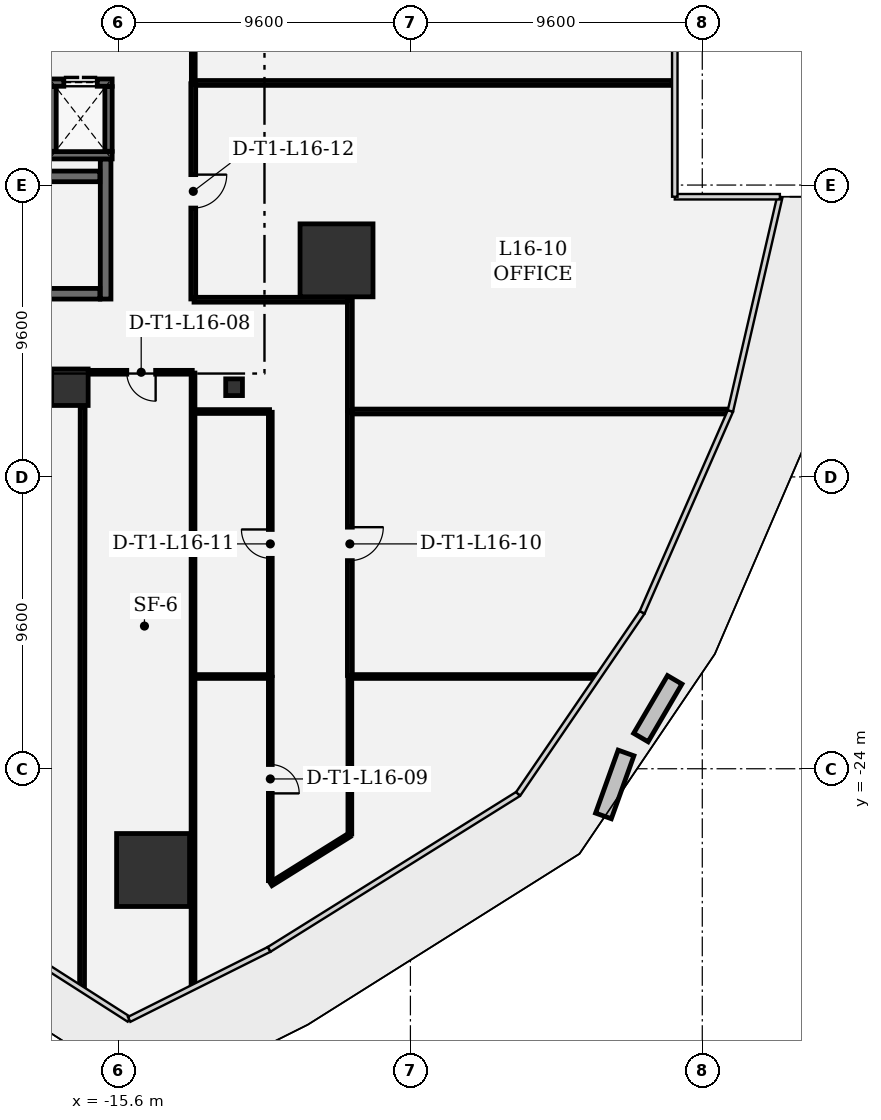
"""IFC4 building model, lengths in metres.
Left out: names, types, materials, properties, quantities, classifications, styles, units other than length and angle.
Written with IfcOpenShell. Run it as: python <this file> out.ifc"""

import sys

from ifc_helpers import new_model, si_unit, direction, frame, frame_2d, origin, origin_2d, place, context, subcontext, project, spatial, rectangle, extrude, element, fill, save


model = new_model("IFC4")
c1 = context("Model", 3, precision=1e-05, world=origin(), true_north=direction((0.0, 1.0)))
c2 = subcontext(c1, "Body", "Model", "MODEL_VIEW")
j1 = project(units=[si_unit("LENGTHUNIT", "METRE"), si_unit("PLANEANGLEUNIT", "RADIAN")], contexts=[c1])
p1 = place(None, origin())
s1 = spatial("IfcSite", under=j1, at=p1, CompositionType="ELEMENT")
p2 = place(p1, origin())
s2 = spatial("IfcBuilding", under=s1, at=p2, CompositionType="ELEMENT")
p3 = place(p2, frame((0.0, 0.0, 74.4)))
s3 = spatial("IfcBuildingStorey", under=s2, at=p3, CompositionType="ELEMENT", Elevation=74.4)
for number, where, z_axis, x_axis in (
    (1, (-14.464, -27.331, 0.0), (0.0, 0.0, 1.0), (1.0, 0.0, 0.0)),
    (2, (-8.43, -7.276, 0.0), (0.0, 0.0, 1.0), (1.0, 0.0, 0.0)),
):
    element("IfcColumn", number, at=place(p3, frame(where, z_axis=z_axis, x_axis=x_axis)), inside=s3, PredefinedType="COLUMN", context=c2, shape_type="SweptSolid", body=[
        extrude(rectangle(XDim=2.4, YDim=2.4, at=origin_2d()), origin(), (0.0, 0.0, 1.0), 4.2),
    ])
p4 = place(p3, frame((-17.2, -11.45, 0.0), z_axis=(0.0, 0.0, 1.0), x_axis=(1.0, 0.0, 0.0)))
e3 = element("IfcColumn", 3, at=p4, inside=s3, PredefinedType="COLUMN", context=c2, shape_type="SweptSolid", body=[
    extrude(rectangle(XDim=1.2, YDim=1.2, at=origin_2d()), origin(), (0.0, 0.0, 1.0), 4.2),
])
p5 = place(p3, frame((-11.8, -11.45, 0.0), z_axis=(0.0, 0.0, 1.0), x_axis=(1.0, 0.0, 0.0)))
e4 = element("IfcColumn", 4, at=p5, inside=s3, PredefinedType="COLUMN", context=c2, shape_type="SweptSolid", body=[
    extrude(rectangle(XDim=0.55, YDim=0.55, at=origin_2d()), origin(), (0.0, 0.0, 1.0), 4.2),
])
p6 = place(p3, frame((-16.025, -8.55, 0.0), z_axis=(0.0, 0.0, 1.0), x_axis=(0.0, 1.0, 0.0)))
e5 = element("IfcWall", 5, at=p6, inside=s3, PredefinedType="SHEAR", context=c2, shape_type="SweptSolid", body=[
    extrude(rectangle(XDim=4.61, YDim=0.35, at=frame_2d((2.305, 0.0))), origin(), (0.0, 0.0, 1.0), 3.92),
])
p7 = place(p3, frame((-24.335, -8.375, 0.0), z_axis=(0.0, 0.0, 1.0), x_axis=(1.0, 0.0, 0.0)))
e6 = element("IfcWall", 6, at=p7, inside=s3, PredefinedType="SHEAR", context=c2, shape_type="SweptSolid", body=[
    extrude(rectangle(XDim=8.12, YDim=0.35, at=frame_2d((4.06, 0.0))), origin(), (0.0, 0.0, 1.0), 3.92),
])
p8 = place(p7, frame((0.28, 0.0, 0.0)))
e7 = element("IfcOpeningElement", 7, at=p8, cuts=e6, PredefinedType="OPENING", context=c2, shape_type="SweptSolid", body=[
    extrude(rectangle(XDim=1.1, YDim=2.2, at=frame_2d((0.55, 1.1))), frame((0.0, 0.185, 0.0), z_axis=(0.0, -1.0, 0.0), x_axis=(1.0, 0.0, 0.0)), (0.0, 0.0, 1.0), 0.37),
])
p9 = place(p3, frame((-16.215, -4.515, 0.0), z_axis=(0.0, 0.0, 1.0), x_axis=(-1.0, 0.0, 0.0)))
e8 = element("IfcWall", 8, at=p9, inside=s3, PredefinedType="SHEAR", context=c2, shape_type="SweptSolid", body=[
    extrude(rectangle(XDim=8.12, YDim=0.35, at=frame_2d((4.06, 0.0))), origin(), (0.0, 0.0, 1.0), 3.92),
])
p10 = place(p3, frame((-15.81, -3.82, 0.0), z_axis=(0.0, 0.0, 1.0), x_axis=(-1.0, 0.0, 0.0)))
e9 = element("IfcWall", 9, at=p10, inside=s3, PredefinedType="SHEAR", context=c2, shape_type="SweptSolid", body=[
    extrude(rectangle(XDim=2.08, YDim=0.24, at=frame_2d((1.04, 0.0))), origin(), (0.0, 0.0, 1.0), 3.92),
])
p11 = place(p3, frame((-17.89, -1.43, 0.0), z_axis=(0.0, 0.0, 1.0), x_axis=(1.0, 0.0, 0.0)))
e10 = element("IfcWall", 10, at=p11, inside=s3, PredefinedType="SHEAR", context=c2, shape_type="SweptSolid", body=[
    extrude(rectangle(XDim=2.08, YDim=0.24, at=frame_2d((1.04, 0.0))), origin(), (0.0, 0.0, 1.0), 3.92),
])
p12 = place(p11, frame((0.49, 0.0, 0.0)))
e11 = element("IfcOpeningElement", 11, at=p12, cuts=e10, PredefinedType="OPENING", context=c2, shape_type="SweptSolid", body=[
    extrude(rectangle(XDim=1.1, YDim=2.2, at=frame_2d((0.55, 1.1))), frame((0.0, 0.13, 0.0), z_axis=(0.0, -1.0, 0.0), x_axis=(1.0, 0.0, 0.0)), (0.0, 0.0, 1.0), 0.26),
])
for number, where, z_axis, x_axis in (
    (12, (-17.77, -3.688, 0.0), (0.0, 0.0, 1.0), (0.0, 1.0, 0.0)),
    (13, (-15.93, -1.562, 0.0), (0.0, 0.0, 1.0), (0.0, -1.0, 0.0)),
):
    element("IfcWall", number, at=place(p3, frame(where, z_axis=z_axis, x_axis=x_axis)), inside=s3, PredefinedType="SHEAR", context=c2, shape_type="SweptSolid", body=[
        extrude(rectangle(XDim=2.126, YDim=0.24, at=frame_2d((1.063, 0.0))), origin(), (0.0, 0.0, 1.0), 3.92),
    ])
p13 = place(p3, frame((-16.801, -31.174, 0.0), z_axis=(0.0, 0.0, 1.0), x_axis=(0.001037569734, 0.999999461724, 0.0)))
e14 = element("IfcWall", 14, at=p13, inside=s3, PredefinedType="PARTITIONING", context=c2, shape_type="SweptSolid", body=[
    extrude(rectangle(XDim=19.059, YDim=0.16, at=frame_2d((9.53, 0.0))), origin(), (0.0, 0.0, 1.0), 2.957),
])
p14 = place(p3, frame((-13.15, -31.113, 0.0), z_axis=(0.0, 0.0, 1.0), x_axis=(0.0, 1.0, 0.0)))
e15 = element("IfcWall", 15, at=p14, inside=s3, PredefinedType="PARTITIONING", context=c2, shape_type="SweptSolid", body=[
    extrude(rectangle(XDim=20.13, YDim=0.125, at=frame_2d((10.065, 0.0))), origin(), (0.0, 0.0, 1.0), 2.89),
])
p15 = place(p3, frame((-13.175, -10.958, 0.0), z_axis=(0.0, 0.0, 1.0), x_axis=(-1.0, 0.0, 0.0)))
e16 = element("IfcWall", 16, at=p15, inside=s3, PredefinedType="PARTITIONING", context=c2, shape_type="SweptSolid", body=[
    extrude(rectangle(XDim=3.36, YDim=0.125, at=frame_2d((1.68, 0.0))), origin(), (0.0, 0.0, 1.0), 2.957),
])
p16 = place(p15, frame((1.205, 0.0, 0.0)))
e17 = element("IfcOpeningElement", 17, at=p16, cuts=e16, PredefinedType="OPENING", context=c2, shape_type="SweptSolid", body=[
    extrude(rectangle(XDim=0.95, YDim=2.15, at=frame_2d((0.475, 1.075))), frame((0.0, 0.073, 0.0), z_axis=(0.0, -1.0, 0.0), x_axis=(1.0, 0.0, 0.0)), (0.0, 0.0, 1.0), 0.145),
])
p17 = place(p3, frame((0.101, -20.966, 0.0), z_axis=(0.0, 0.0, 1.0), x_axis=(-1.0, 0.0, 0.0)))
e18 = element("IfcWall", 18, at=p17, inside=s3, PredefinedType="PARTITIONING", context=c2, shape_type="SweptSolid", body=[
    extrude(rectangle(XDim=8.068, YDim=0.125, at=frame_2d((4.034, 0.0))), origin(), (0.0, 0.0, 1.0), 3.92),
])
p18 = place(p3, frame((-7.992, -26.146, 0.0), z_axis=(0.0, 0.0, 1.0), x_axis=(0.0, 1.0, 0.0)))
e19 = element("IfcWall", 19, at=p18, inside=s3, PredefinedType="PARTITIONING", context=c2, shape_type="SweptSolid", body=[
    extrude(rectangle(XDim=5.156, YDim=0.125, at=frame_2d((2.578, 0.0))), origin(), (0.0, 0.0, 1.0), 3.92),
])
p19 = place(p3, frame((-10.587, -27.792, 0.0), z_axis=(0.0, 0.0, 1.0), x_axis=(0.848183593327, 0.529702361718, 0.0)))
e20 = element("IfcWall", 20, at=p19, inside=s3, PredefinedType="PARTITIONING", context=c2, shape_type="SweptSolid", body=[
    extrude(rectangle(XDim=3.034, YDim=0.125, at=frame_2d((1.517, 0.0))), origin(), (0.0, 0.0, 1.0), 3.92),
])
p20 = place(p3, frame((-10.608, -20.99, 0.0), z_axis=(0.0, 0.0, 1.0), x_axis=(0.0, -1.0, 0.0)))
e21 = element("IfcWall", 21, at=p20, inside=s3, PredefinedType="PARTITIONING", context=c2, shape_type="SweptSolid", body=[
    extrude(rectangle(XDim=6.689, YDim=0.125, at=frame_2d((3.345, 0.0))), origin(), (0.0, 0.0, 1.0), 3.92),
])
p21 = place(p20, frame((2.87, 0.0, 0.0)))
e22 = element("IfcOpeningElement", 22, at=p21, cuts=e21, PredefinedType="OPENING", context=c2, shape_type="SweptSolid", body=[
    extrude(rectangle(XDim=0.95, YDim=2.15, at=frame_2d((0.475, 1.075))), frame((0.0, 0.073, 0.0), z_axis=(0.0, -1.0, 0.0), x_axis=(1.0, 0.0, 0.0)), (0.0, 0.0, 1.0), 0.145),
])
p22 = place(p3, frame((-10.633, -20.966, 0.0), z_axis=(0.0, 0.0, 1.0), x_axis=(-1.0, 0.0, 0.0)))
e23 = element("IfcWall", 23, at=p22, inside=s3, PredefinedType="PARTITIONING", context=c2, shape_type="SweptSolid", body=[
    extrude(rectangle(XDim=2.407, YDim=0.125, at=frame_2d((1.204, 0.0))), origin(), (0.0, 0.0, 1.0), 3.92),
])
p23 = place(p3, frame((4.438, -12.249, 0.0), z_axis=(0.0, 0.0, 1.0), x_axis=(-1.0, 0.0, 0.0)))
e24 = element("IfcWall", 24, at=p23, inside=s3, PredefinedType="PARTITIONING", context=c2, shape_type="SweptSolid", body=[
    extrude(rectangle(XDim=12.404, YDim=0.16, at=frame_2d((6.202, 0.0))), origin(), (0.0, 0.0, 1.0), 3.92),
])
p24 = place(p3, frame((-7.992, -12.274, 0.0), z_axis=(0.0, 0.0, 1.0), x_axis=(0.0, -1.0, 0.0)))
e25 = element("IfcWall", 25, at=p24, inside=s3, PredefinedType="PARTITIONING", context=c2, shape_type="SweptSolid", body=[
    extrude(rectangle(XDim=8.658, YDim=0.16, at=frame_2d((4.329, 0.0))), origin(), (0.0, 0.0, 1.0), 3.92),
])
p25 = place(p24, frame((3.779, 0.0, 0.0)))
e26 = element("IfcOpeningElement", 26, at=p25, cuts=e25, PredefinedType="OPENING", context=c2, shape_type="SweptSolid", body=[
    extrude(rectangle(XDim=1.1, YDim=2.15, at=frame_2d((0.55, 1.075))), frame((0.0, 0.09, 0.0), z_axis=(0.0, -1.0, 0.0), x_axis=(1.0, 0.0, 0.0)), (0.0, 0.0, 1.0), 0.18),
])
p26 = place(p3, frame((-10.608, -20.933, 0.0), z_axis=(0.0, 0.0, 1.0), x_axis=(0.0, 1.0, 0.0)))
e27 = element("IfcWall", 27, at=p26, inside=s3, PredefinedType="PARTITIONING", context=c2, shape_type="SweptSolid", body=[
    extrude(rectangle(XDim=8.658, YDim=0.125, at=frame_2d((4.329, 0.0))), origin(), (0.0, 0.0, 1.0), 2.89),
])
p27 = place(p26, frame((3.854, 0.0, 0.0)))
e28 = element("IfcOpeningElement", 28, at=p27, cuts=e27, PredefinedType="OPENING", context=c2, shape_type="SweptSolid", body=[
    extrude(rectangle(XDim=0.95, YDim=2.15, at=frame_2d((0.475, 1.075))), frame((0.0, 0.073, 0.0), z_axis=(0.0, -1.0, 0.0), x_axis=(1.0, 0.0, 0.0)), (0.0, 0.0, 1.0), 0.145),
])
p28 = place(p3, frame((-10.633, -12.249, 0.0), z_axis=(0.0, 0.0, 1.0), x_axis=(-1.0, 0.0, 0.0)))
e29 = element("IfcWall", 29, at=p28, inside=s3, PredefinedType="PARTITIONING", context=c2, shape_type="SweptSolid", body=[
    extrude(rectangle(XDim=2.407, YDim=0.125, at=frame_2d((1.204, 0.0))), origin(), (0.0, 0.0, 1.0), 3.92),
])
p29 = place(p3, frame((2.616, -1.441, 0.0), z_axis=(0.0, 0.0, 1.0), x_axis=(-1.0, 0.0, 0.0)))
e30 = element("IfcWall", 30, at=p29, inside=s3, PredefinedType="PARTITIONING", context=c2, shape_type="SweptSolid", body=[
    extrude(rectangle(XDim=15.733, YDim=0.16, at=frame_2d((7.866, 0.0))), origin(), (0.0, 0.0, 1.0), 3.92),
])
p30 = place(p3, frame((-13.142, -1.466, 0.0), z_axis=(0.0, 0.0, 1.0), x_axis=(0.0, -1.0, 0.0)))
e31 = element("IfcWall", 31, at=p30, inside=s3, PredefinedType="PARTITIONING", context=c2, shape_type="SweptSolid", body=[
    extrude(rectangle(XDim=7.081, YDim=0.16, at=frame_2d((3.541, 0.0))), origin(), (0.0, 0.0, 1.0), 3.92),
])
p31 = place(p30, frame((2.99, 0.0, 0.0)))
e32 = element("IfcOpeningElement", 32, at=p31, cuts=e31, PredefinedType="OPENING", context=c2, shape_type="SweptSolid", body=[
    extrude(rectangle(XDim=1.1, YDim=2.15, at=frame_2d((0.55, 1.075))), frame((0.0, 0.09, 0.0), z_axis=(0.0, -1.0, 0.0), x_axis=(1.0, 0.0, 0.0)), (0.0, 0.0, 1.0), 0.18),
])
p32 = place(p3, frame((-13.117, -8.572, 0.0), z_axis=(0.0, 0.0, 1.0), x_axis=(1.0, 0.0, 0.0)))
e33 = element("IfcWall", 33, at=p32, inside=s3, PredefinedType="PARTITIONING", context=c2, shape_type="SweptSolid", body=[
    extrude(rectangle(XDim=5.1, YDim=0.16, at=frame_2d((2.55, 0.0))), origin(), (0.0, 0.0, 1.0), 2.957),
])
p33 = place(p3, frame((-7.992, -8.597, 0.0), z_axis=(0.0, 0.0, 1.0), x_axis=(0.0, -1.0, 0.0)))
e34 = element("IfcWall", 34, at=p33, inside=s3, PredefinedType="PARTITIONING", context=c2, shape_type="SweptSolid", body=[
    extrude(rectangle(XDim=3.619, YDim=0.16, at=frame_2d((1.81, 0.0))), origin(), (0.0, 0.0, 1.0), 3.92),
])
p34 = place(p3, frame((-13.142, 10.758, 0.0), z_axis=(0.0, 0.0, 1.0), x_axis=(0.0, -1.0, 0.0)))
e35 = element("IfcWall", 35, at=p34, inside=s3, PredefinedType="PARTITIONING", context=c2, shape_type="SweptSolid", body=[
    extrude(rectangle(XDim=12.167, YDim=0.125, at=frame_2d((6.083, 0.0))), origin(), (0.0, 0.0, 1.0), 3.92),
])
p35 = place(p34, frame((5.608, 0.0, 0.0)))
e36 = element("IfcOpeningElement", 36, at=p35, cuts=e35, PredefinedType="OPENING", context=c2, shape_type="SweptSolid", body=[
    extrude(rectangle(XDim=0.95, YDim=2.15, at=frame_2d((0.475, 1.075))), frame((0.0, 0.073, 0.0), z_axis=(0.0, -1.0, 0.0), x_axis=(1.0, 0.0, 0.0)), (0.0, 0.0, 1.0), 0.145),
])
p36 = place(p12, origin())
e37 = element("IfcDoor", 37, at=p36, inside=s3, OperationType="DOUBLE_DOOR_SLIDING", PredefinedType="DOOR", context=c2, shape_type="SweptSolid", body=[
    extrude(rectangle(XDim=1.1, YDim=2.2, at=frame_2d((0.55, 1.1))), frame((0.0, 0.025, 0.0), z_axis=(0.0, -1.0, 0.0), x_axis=(1.0, 0.0, 0.0)), (0.0, 0.0, 1.0), 0.05),
])
fill(e11, e37)
p37 = place(p16, origin())
e38 = element("IfcDoor", 38, at=p37, inside=s3, OperationType="SINGLE_SWING_LEFT", PredefinedType="DOOR", context=c2, shape_type="SweptSolid", body=[
    extrude(rectangle(XDim=0.95, YDim=2.15, at=frame_2d((0.475, 1.075))), frame((0.0, 0.025, 0.0), z_axis=(0.0, -1.0, 0.0), x_axis=(1.0, 0.0, 0.0)), (0.0, 0.0, 1.0), 0.05),
])
fill(e17, e38)
p38 = place(p21, origin())
e39 = element("IfcDoor", 39, at=p38, inside=s3, OperationType="SINGLE_SWING_RIGHT", PredefinedType="DOOR", context=c2, shape_type="SweptSolid", body=[
    extrude(rectangle(XDim=0.95, YDim=2.15, at=frame_2d((0.475, 1.075))), frame((0.0, 0.025, 0.0), z_axis=(0.0, -1.0, 0.0), x_axis=(1.0, 0.0, 0.0)), (0.0, 0.0, 1.0), 0.05),
])
fill(e22, e39)
p39 = place(p25, origin())
e40 = element("IfcDoor", 40, at=p39, inside=s3, OperationType="SINGLE_SWING_LEFT", PredefinedType="DOOR", context=c2, shape_type="SweptSolid", body=[
    extrude(rectangle(XDim=1.1, YDim=2.15, at=frame_2d((0.55, 1.075))), frame((0.0, 0.025, 0.0), z_axis=(0.0, -1.0, 0.0), x_axis=(1.0, 0.0, 0.0)), (0.0, 0.0, 1.0), 0.05),
])
fill(e26, e40)
p40 = place(p27, origin())
e41 = element("IfcDoor", 41, at=p40, inside=s3, OperationType="SINGLE_SWING_RIGHT", PredefinedType="DOOR", context=c2, shape_type="SweptSolid", body=[
    extrude(rectangle(XDim=0.95, YDim=2.15, at=frame_2d((0.475, 1.075))), frame((0.0, 0.025, 0.0), z_axis=(0.0, -1.0, 0.0), x_axis=(1.0, 0.0, 0.0)), (0.0, 0.0, 1.0), 0.05),
])
fill(e28, e41)
p41 = place(p31, origin())
e42 = element("IfcDoor", 42, at=p41, inside=s3, OperationType="SINGLE_SWING_LEFT", PredefinedType="DOOR", context=c2, shape_type="SweptSolid", body=[
    extrude(rectangle(XDim=1.1, YDim=2.15, at=frame_2d((0.55, 1.075))), frame((0.0, 0.025, 0.0), z_axis=(0.0, -1.0, 0.0), x_axis=(1.0, 0.0, 0.0)), (0.0, 0.0, 1.0), 0.05),
])
fill(e32, e42)
save(model, sys.argv[1])
